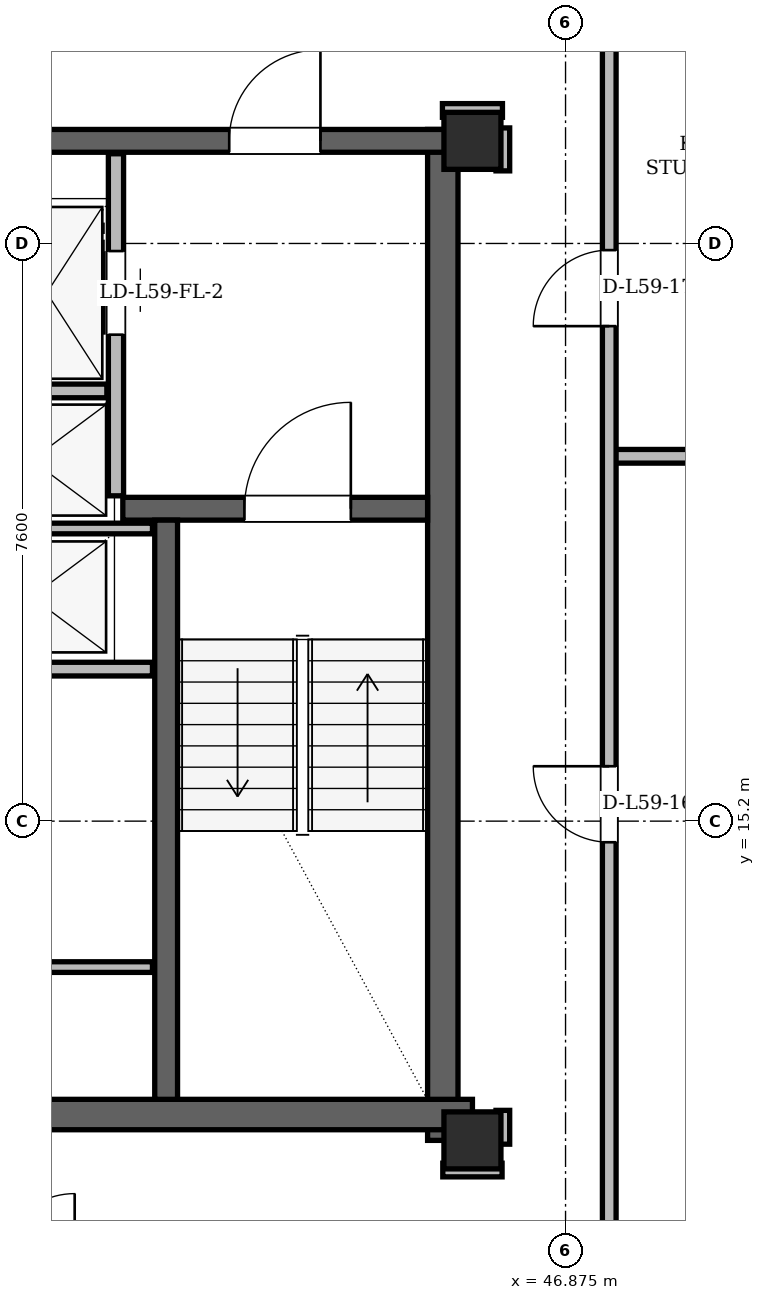
"""IFC4 building model, lengths in metres.
Left out: names, types, materials, properties, quantities, classifications, styles, units other than length and angle.
Written with IfcOpenShell. Run it as: python <this file> out.ifc"""

import sys

from ifc_helpers import new_model, si_unit, direction, frame, frame_2d, origin, origin_2d, place, context, subcontext, project, spatial, rectangle, hollow_rectangle, extrude, element, fill, save


model = new_model("IFC4")
c1 = context("Model", 3, precision=1e-05, world=origin(), true_north=direction((0.0, 1.0)))
c2 = subcontext(c1, "Body", "Model", "MODEL_VIEW")
j1 = project(units=[si_unit("LENGTHUNIT", "METRE"), si_unit("PLANEANGLEUNIT", "RADIAN")], contexts=[c1])
p1 = place(None, origin())
s1 = spatial("IfcSite", under=j1, at=p1, CompositionType="ELEMENT")
p2 = place(p1, origin())
s2 = spatial("IfcBuilding", under=s1, at=p2, CompositionType="ELEMENT")
p3 = place(p2, frame((0.0, 0.0, 223.5)))
s3 = spatial("IfcBuildingStorey", under=s2, at=p3, CompositionType="ELEMENT", Elevation=223.5)
for number, where, z_axis, x_axis in (
    (1, (45.65, 11.0, 0.0), (0.0, 0.0, 1.0), (1.0, 0.0, 0.0)),
    (2, (45.65, 24.15, 0.0), (0.0, 0.0, 1.0), (1.0, 0.0, 0.0)),
):
    element("IfcColumn", number, at=place(p3, frame(where, z_axis=z_axis, x_axis=x_axis)), inside=s3, PredefinedType="COLUMN", context=c2, shape_type="SweptSolid", body=[
        extrude(hollow_rectangle(XDim=0.75, YDim=0.75, WallThickness=0.06, at=origin_2d()), origin(), (0.0, 0.0, 1.0), 3.6),
    ])
p4 = place(p3, frame((45.26, 11.0, 0.0), z_axis=(0.0, 0.0, 1.0), x_axis=(0.0, 1.0, 0.0)))
e3 = element("IfcWall", 3, at=p4, inside=s3, PredefinedType="SHEAR", context=c2, shape_type="SweptSolid", body=[
    extrude(rectangle(XDim=13.3, YDim=0.4, at=frame_2d((6.65, 0.0))), origin(), (0.0, 0.0, 1.0), 3.38),
])
p5 = place(p3, frame((38.55, 11.34, 0.0), z_axis=(0.0, 0.0, 1.0), x_axis=(1.0, 0.0, 0.0)))
e4 = element("IfcWall", 4, at=p5, inside=s3, PredefinedType="SHEAR", context=c2, shape_type="SweptSolid", body=[
    extrude(rectangle(XDim=7.1, YDim=0.4, at=frame_2d((3.55, 0.0))), origin(), (0.0, 0.0, 1.0), 3.38),
])
p6 = place(p3, frame((29.65, 24.15, 0.0), z_axis=(0.0, 0.0, 1.0), x_axis=(1.0, 0.0, 0.0)))
e5 = element("IfcWall", 5, at=p6, inside=s3, PredefinedType="SHEAR", context=c2, shape_type="SweptSolid", body=[
    extrude(rectangle(XDim=15.7, YDim=0.3, at=frame_2d((7.85, 0.0))), origin(), (0.0, 0.0, 1.0), 3.38),
])
p7 = place(p6, frame((1.7, 0.0, 0.0)))
e6 = element("IfcOpeningElement", 6, at=p7, cuts=e5, PredefinedType="OPENING", context=c2, shape_type="SweptSolid", body=[
    extrude(rectangle(XDim=1.2, YDim=2.2, at=frame_2d((0.6, 1.1))), frame((0.0, 0.15, 0.0), z_axis=(0.0, -1.0, 0.0), x_axis=(1.0, 0.0, 0.0)), (0.0, 0.0, 1.0), 0.3),
])
p8 = place(p6, frame((12.8, 0.0, 0.0)))
e7 = element("IfcOpeningElement", 7, at=p8, cuts=e5, PredefinedType="OPENING", context=c2, shape_type="SweptSolid", body=[
    extrude(rectangle(XDim=1.2, YDim=2.2, at=frame_2d((0.6, 1.1))), frame((0.0, 0.15, 0.0), z_axis=(0.0, -1.0, 0.0), x_axis=(1.0, 0.0, 0.0)), (0.0, 0.0, 1.0), 0.3),
])
p9 = place(p6, frame((6.55, 0.0, 0.0)))
e8 = element("IfcOpeningElement", 8, at=p9, cuts=e5, PredefinedType="OPENING", context=c2, shape_type="SweptSolid", body=[
    extrude(rectangle(XDim=0.9, YDim=2.05, at=frame_2d((0.45, 1.025))), frame((0.0, 0.15, 0.0), z_axis=(0.0, -1.0, 0.0), x_axis=(1.0, 0.0, 0.0)), (0.0, 0.0, 1.0), 0.3),
])
p10 = place(p6, frame((8.45, 0.0, 0.0)))
e9 = element("IfcOpeningElement", 9, at=p10, cuts=e5, PredefinedType="OPENING", context=c2, shape_type="SweptSolid", body=[
    extrude(rectangle(XDim=0.9, YDim=2.05, at=frame_2d((0.45, 1.025))), frame((0.0, 0.15, 0.0), z_axis=(0.0, -1.0, 0.0), x_axis=(1.0, 0.0, 0.0)), (0.0, 0.0, 1.0), 0.3),
])
p11 = place(p3, frame((41.05, 19.31, 0.0), z_axis=(0.0, 0.0, 1.0), x_axis=(1.0, 0.0, 0.0)))
e10 = element("IfcWall", 10, at=p11, inside=s3, PredefinedType="SHEAR", context=c2, shape_type="SweptSolid", body=[
    extrude(rectangle(XDim=4.01, YDim=0.3, at=frame_2d((2.005, 0.0))), origin(), (0.0, 0.0, 1.0), 3.38),
])
p12 = place(p11, frame((1.6, 0.0, 0.0)))
e11 = element("IfcOpeningElement", 11, at=p12, cuts=e10, PredefinedType="OPENING", context=c2, shape_type="SweptSolid", body=[
    extrude(rectangle(XDim=1.4, YDim=2.2, at=frame_2d((0.7, 1.1))), frame((0.0, 0.15, 0.0), z_axis=(0.0, -1.0, 0.0), x_axis=(1.0, 0.0, 0.0)), (0.0, 0.0, 1.0), 0.3),
])
p13 = place(p3, frame((41.62, 11.54, 0.0), z_axis=(0.0, 0.0, 1.0), x_axis=(0.0, 1.0, 0.0)))
e12 = element("IfcWall", 12, at=p13, inside=s3, PredefinedType="SHEAR", context=c2, shape_type="SweptSolid", body=[
    extrude(rectangle(XDim=7.62, YDim=0.3, at=frame_2d((3.81, 0.0))), origin(), (0.0, 0.0, 1.0), 3.38),
])
p14 = place(p3, frame((59.07, 11.372, 0.0), z_axis=(0.0, 0.0, 1.0), x_axis=(-0.500000292553, 0.866025234879, 0.0)))
e13 = element("IfcWall", 13, at=p14, inside=s3, PredefinedType="SOLIDWALL", context=c2, shape_type="SweptSolid", body=[
    extrude(rectangle(XDim=36.688, YDim=0.29, at=frame_2d((18.344, 0.0))), origin(), (0.0, 0.0, 1.0), 2.677),
])
p15 = place(p14, frame((3.429, 0.0, 0.0)))
e14 = element("IfcOpeningElement", 14, at=p15, cuts=e13, PredefinedType="OPENING", context=c2, shape_type="SweptSolid", body=[
    extrude(rectangle(XDim=1.5, YDim=2.2, at=frame_2d((0.75, 1.1))), frame((0.0, 0.145, 0.0), z_axis=(0.0, -1.0, 0.0), x_axis=(1.0, 0.0, 0.0)), (0.0, 0.0, 1.0), 0.29),
])
p16 = place(p14, frame((27.154, 0.0, 0.0)))
e15 = element("IfcOpeningElement", 15, at=p16, cuts=e13, PredefinedType="OPENING", context=c2, shape_type="SweptSolid", body=[
    extrude(rectangle(XDim=1.5, YDim=2.2, at=frame_2d((0.75, 1.1))), frame((0.0, 0.145, 0.0), z_axis=(0.0, -1.0, 0.0), x_axis=(1.0, 0.0, 0.0)), (0.0, 0.0, 1.0), 0.29),
])
p17 = place(p14, frame((7.878, 0.0, 0.85)))
e16 = element("IfcOpeningElement", 16, at=p17, cuts=e13, PredefinedType="OPENING", context=c2, shape_type="SweptSolid", body=[
    extrude(rectangle(XDim=1.2, YDim=1.48, at=frame_2d((0.6, 0.74))), frame((0.0, 0.145, 0.0), z_axis=(0.0, -1.0, 0.0), x_axis=(1.0, 0.0, 0.0)), (0.0, 0.0, 1.0), 0.29),
])
p18 = place(p14, frame((1.266, 0.0, 0.85)))
e17 = element("IfcOpeningElement", 17, at=p18, cuts=e13, PredefinedType="OPENING", context=c2, shape_type="SweptSolid", body=[
    extrude(rectangle(XDim=1.2, YDim=1.48, at=frame_2d((0.6, 0.74))), frame((0.0, 0.145, 0.0), z_axis=(0.0, -1.0, 0.0), x_axis=(1.0, 0.0, 0.0)), (0.0, 0.0, 1.0), 0.29),
])
p19 = place(p14, frame((12.232, 0.0, 0.85)))
e18 = element("IfcOpeningElement", 18, at=p19, cuts=e13, PredefinedType="OPENING", context=c2, shape_type="SweptSolid", body=[
    extrude(rectangle(XDim=2.0, YDim=1.717, at=frame_2d((1.0, 0.858))), frame((0.0, 0.145, 0.0), z_axis=(0.0, -1.0, 0.0), x_axis=(1.0, 0.0, 0.0)), (0.0, 0.0, 1.0), 0.29),
])
p20 = place(p14, frame((17.268, 0.0, 0.85)))
e19 = element("IfcOpeningElement", 19, at=p20, cuts=e13, PredefinedType="OPENING", context=c2, shape_type="SweptSolid", body=[
    extrude(rectangle(XDim=1.4, YDim=1.6, at=frame_2d((0.7, 0.8))), frame((0.0, 0.145, 0.0), z_axis=(0.0, -1.0, 0.0), x_axis=(1.0, 0.0, 0.0)), (0.0, 0.0, 1.0), 0.29),
])
p21 = place(p14, frame((20.594, 0.0, 0.85)))
e20 = element("IfcOpeningElement", 20, at=p21, cuts=e13, PredefinedType="OPENING", context=c2, shape_type="SweptSolid", body=[
    extrude(rectangle(XDim=1.2, YDim=1.48, at=frame_2d((0.6, 0.74))), frame((0.0, 0.145, 0.0), z_axis=(0.0, -1.0, 0.0), x_axis=(1.0, 0.0, 0.0)), (0.0, 0.0, 1.0), 0.29),
])
p22 = place(p14, frame((34.312, 0.0, 0.85)))
e21 = element("IfcOpeningElement", 21, at=p22, cuts=e13, PredefinedType="OPENING", context=c2, shape_type="SweptSolid", body=[
    extrude(rectangle(XDim=1.2, YDim=1.48, at=frame_2d((0.6, 0.74))), frame((0.0, 0.145, 0.0), z_axis=(0.0, -1.0, 0.0), x_axis=(1.0, 0.0, 0.0)), (0.0, 0.0, 1.0), 0.29),
])
p23 = place(p3, frame((40.96, 19.48, 0.0), z_axis=(0.0, 0.0, 1.0), x_axis=(0.0, 1.0, 0.0)))
e22 = element("IfcWall", 22, at=p23, inside=s3, PredefinedType="PARTITIONING", context=c2, shape_type="SweptSolid", body=[
    extrude(rectangle(XDim=4.5, YDim=0.2, at=frame_2d((2.25, 0.0))), origin(), (0.0, 0.0, 1.0), 3.38),
])
p24 = place(p23, frame((2.12, 0.0, 0.0)))
e23 = element("IfcOpeningElement", 23, at=p24, cuts=e22, PredefinedType="OPENING", context=c2, shape_type="SweptSolid", body=[
    extrude(rectangle(XDim=1.1, YDim=2.2, at=frame_2d((0.55, 1.1))), frame((0.0, 0.1, 0.0), z_axis=(0.0, -1.0, 0.0), x_axis=(1.0, 0.0, 0.0)), (0.0, 0.0, 1.0), 0.2),
])
p25 = place(p3, frame((39.26, 20.86, 0.0), z_axis=(0.0, 0.0, 1.0), x_axis=(1.0, 0.0, 0.0)))
e24 = element("IfcWall", 24, at=p25, inside=s3, PredefinedType="PARTITIONING", context=c2, shape_type="SweptSolid", body=[
    extrude(rectangle(XDim=1.58, YDim=0.18, at=frame_2d((0.79, 0.0))), origin(), (0.0, 0.0, 1.0), 3.38),
])
p26 = place(p3, frame((38.78, 17.2, 0.0), z_axis=(0.0, 0.0, 1.0), x_axis=(1.0, 0.0, 0.0)))
e25 = element("IfcWall", 25, at=p26, inside=s3, PredefinedType="PARTITIONING", context=c2, shape_type="SweptSolid", body=[
    extrude(rectangle(XDim=2.66, YDim=0.18, at=frame_2d((1.33, 0.0))), origin(), (0.0, 0.0, 1.0), 3.38),
])
for number, where, z_axis, x_axis in (
    (26, (38.78, 19.05, 0.0), (0.0, 0.0, 1.0), (1.0, 0.0, 0.0)),
    (27, (38.78, 13.28, 0.0), (0.0, 0.0, 1.0), (1.0, 0.0, 0.0)),
):
    element("IfcWall", number, at=place(p3, frame(where, z_axis=z_axis, x_axis=x_axis)), inside=s3, PredefinedType="PARTITIONING", context=c2, shape_type="SweptSolid", body=[
        extrude(rectangle(XDim=2.66, YDim=0.14, at=frame_2d((1.33, 0.0))), origin(), (0.0, 0.0, 1.0), 3.38),
    ])
p27 = place(p3, frame((45.26, 10.61, 0.0), z_axis=(0.0, 0.0, 1.0), x_axis=(1.0, 0.0, 0.0)))
e28 = element("IfcWall", 28, at=p27, inside=s3, PredefinedType="PARTITIONING", context=c2, shape_type="SweptSolid", body=[
    extrude(rectangle(XDim=0.78, YDim=0.18, at=frame_2d((0.39, 0.0))), origin(), (0.0, 0.0, 1.0), 3.38),
])
p28 = place(p3, frame((47.45, 20.0, 0.0), z_axis=(0.0, 0.0, 1.0), x_axis=(1.0, 0.0, 0.0)))
e29 = element("IfcWall", 29, at=p28, inside=s3, PredefinedType="PARTITIONING", context=c2, shape_type="SweptSolid", body=[
    extrude(rectangle(XDim=6.467, YDim=0.18, at=frame_2d((3.233, 0.0))), origin(), (0.0, 0.0, 1.0), 3.38),
])
p29 = place(p3, frame((45.255, 24.55, 0.0), z_axis=(0.0, 0.0, 1.0), x_axis=(1.0, 0.0, 0.0)))
e30 = element("IfcWall", 30, at=p29, inside=s3, PredefinedType="PARTITIONING", context=c2, shape_type="SweptSolid", body=[
    extrude(rectangle(XDim=0.79, YDim=0.18, at=frame_2d((0.395, 0.0))), origin(), (0.0, 0.0, 1.0), 2.913),
])
p30 = place(p3, frame((46.05, 10.95, 0.0), z_axis=(0.0, 0.0, 1.0), x_axis=(0.0, 1.0, 0.0)))
e31 = element("IfcWall", 31, at=p30, inside=s3, PredefinedType="PARTITIONING", context=c2, shape_type="SweptSolid", body=[
    extrude(rectangle(XDim=0.445, YDim=0.18, at=frame_2d((0.223, 0.0))), origin(), (0.0, 0.0, 1.0), 2.913),
])
p31 = place(p3, frame((46.05, 23.755, 0.0), z_axis=(0.0, 0.0, 1.0), x_axis=(0.0, 1.0, 0.0)))
e32 = element("IfcWall", 32, at=p31, inside=s3, PredefinedType="PARTITIONING", context=c2, shape_type="SweptSolid", body=[
    extrude(rectangle(XDim=0.565, YDim=0.18, at=frame_2d((0.283, 0.0))), origin(), (0.0, 0.0, 1.0), 3.38),
])
p32 = place(p3, frame((47.45, 5.933, 0.0), z_axis=(0.0, 0.0, 1.0), x_axis=(0.0, 1.0, 0.0)))
e33 = element("IfcWall", 33, at=p32, inside=s3, PredefinedType="PARTITIONING", context=c2, shape_type="SweptSolid", body=[
    extrude(rectangle(XDim=25.267, YDim=0.18, at=frame_2d((12.634, 0.0))), origin(), (0.0, 0.0, 1.0), 2.913),
])
p33 = place(p32, frame((8.989, 0.0, 0.0)))
e34 = element("IfcOpeningElement", 34, at=p33, cuts=e33, PredefinedType="OPENING", context=c2, shape_type="SweptSolid", body=[
    extrude(rectangle(XDim=1.0, YDim=2.18, at=frame_2d((0.5, 1.09))), frame((0.0, 0.09, 0.0), z_axis=(0.0, -1.0, 0.0), x_axis=(1.0, 0.0, 0.0)), (0.0, 0.0, 1.0), 0.18),
])
p34 = place(p32, frame((15.779, 0.0, 0.0)))
e35 = element("IfcOpeningElement", 35, at=p34, cuts=e33, PredefinedType="OPENING", context=c2, shape_type="SweptSolid", body=[
    extrude(rectangle(XDim=1.0, YDim=2.18, at=frame_2d((0.5, 1.09))), frame((0.0, 0.09, 0.0), z_axis=(0.0, -1.0, 0.0), x_axis=(1.0, 0.0, 0.0)), (0.0, 0.0, 1.0), 0.18),
])
p35 = place(p24, origin())
e36 = element("IfcDoor", 36, at=p35, inside=s3, OperationType="SLIDING_TO_RIGHT", PredefinedType="DOOR", context=c2, shape_type="SweptSolid", body=[
    extrude(rectangle(XDim=1.1, YDim=2.2, at=frame_2d((0.55, 1.1))), frame((0.0, 0.025, 0.0), z_axis=(0.0, -1.0, 0.0), x_axis=(1.0, 0.0, 0.0)), (0.0, 0.0, 1.0), 0.05),
])
fill(e23, e36)
p36 = place(p12, origin())
e37 = element("IfcDoor", 37, at=p36, inside=s3, OperationType="SINGLE_SWING_RIGHT", PredefinedType="DOOR", context=c2, shape_type="SweptSolid", body=[
    extrude(rectangle(XDim=1.4, YDim=2.2, at=frame_2d((0.7, 1.1))), frame((0.0, 0.025, 0.0), z_axis=(0.0, -1.0, 0.0), x_axis=(1.0, 0.0, 0.0)), (0.0, 0.0, 1.0), 0.05),
])
fill(e11, e37)
p37 = place(p8, origin())
e38 = element("IfcDoor", 38, at=p37, inside=s3, OperationType="SINGLE_SWING_RIGHT", PredefinedType="DOOR", context=c2, shape_type="SweptSolid", body=[
    extrude(rectangle(XDim=1.2, YDim=2.2, at=frame_2d((0.6, 1.1))), frame((0.0, 0.025, 0.0), z_axis=(0.0, -1.0, 0.0), x_axis=(1.0, 0.0, 0.0)), (0.0, 0.0, 1.0), 0.05),
])
fill(e7, e38)
p38 = place(p33, origin())
e39 = element("IfcDoor", 39, at=p38, inside=s3, OperationType="SINGLE_SWING_RIGHT", PredefinedType="DOOR", context=c2, shape_type="SweptSolid", body=[
    extrude(rectangle(XDim=1.0, YDim=2.18, at=frame_2d((0.5, 1.09))), frame((0.0, 0.025, 0.0), z_axis=(0.0, -1.0, 0.0), x_axis=(1.0, 0.0, 0.0)), (0.0, 0.0, 1.0), 0.05),
])
fill(e34, e39)
p39 = place(p34, origin())
e40 = element("IfcDoor", 40, at=p39, inside=s3, OperationType="SINGLE_SWING_LEFT", PredefinedType="DOOR", context=c2, shape_type="SweptSolid", body=[
    extrude(rectangle(XDim=1.0, YDim=2.18, at=frame_2d((0.5, 1.09))), frame((0.0, 0.025, 0.0), z_axis=(0.0, -1.0, 0.0), x_axis=(1.0, 0.0, 0.0)), (0.0, 0.0, 1.0), 0.05),
])
fill(e35, e40)
save(model, sys.argv[1])
